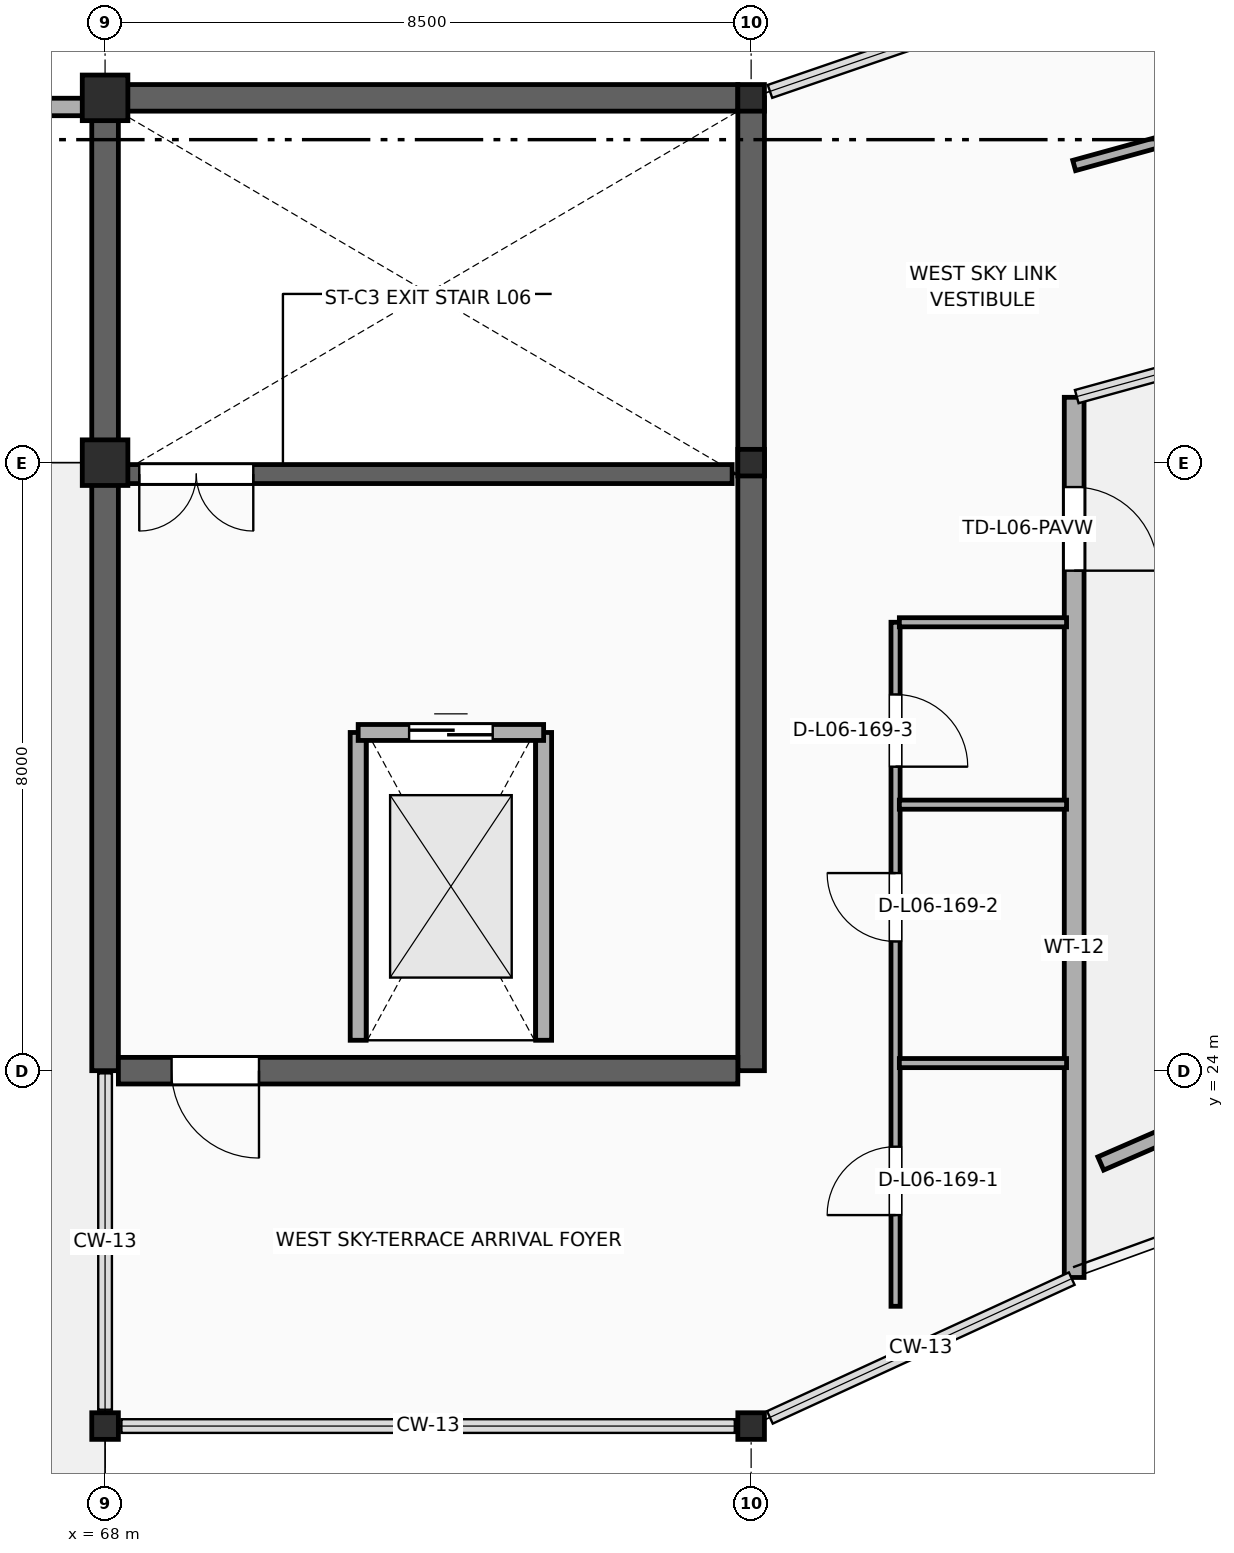
"""IFC4 building model, lengths in metres.
Left out: names, types, materials, properties, quantities, classifications, styles, units other than length and angle.
Written with IfcOpenShell. Run it as: python <this file> out.ifc"""

import sys

from ifc_helpers import new_model, si_unit, direction, frame, frame_2d, origin, origin_2d, place, context, subcontext, project, spatial, rectangle, i_section, extrude, element, fill, save


model = new_model("IFC4")
c1 = context("Model", 3, precision=1e-05, world=origin(), true_north=direction((0.0, 1.0)))
c2 = subcontext(c1, "Body", "Model", "MODEL_VIEW")
j1 = project(units=[si_unit("LENGTHUNIT", "METRE"), si_unit("PLANEANGLEUNIT", "RADIAN")], contexts=[c1])
p1 = place(None, origin())
s1 = spatial("IfcSite", under=j1, at=p1, CompositionType="ELEMENT")
p2 = place(p1, origin())
s2 = spatial("IfcBuilding", under=s1, at=p2, CompositionType="ELEMENT")
p3 = place(p2, frame((0.0, 0.0, 29.4)))
s3 = spatial("IfcBuildingStorey", under=s2, at=p3, CompositionType="ELEMENT", Elevation=29.4)
for number, where, z_axis, x_axis in (
    (1, (68.0, 24.0, 0.0), (0.0, 0.0, 1.0), (0.0, 1.0, 0.0)),
    (2, (76.5, 24.0, 0.0), (0.0, 0.0, 1.0), (0.0, 1.0, 0.0)),
):
    element("IfcWall", number, at=place(p3, frame(where, z_axis=z_axis, x_axis=x_axis)), inside=s3, PredefinedType="SHEAR", context=c2, shape_type="SweptSolid", body=[
        extrude(rectangle(XDim=12.8, YDim=0.35, at=frame_2d((6.4, 0.0))), origin(), (0.0, 0.0, 1.0), 4.49),
    ])
p4 = place(p3, frame((68.175, 36.8, 0.0), z_axis=(0.0, 0.0, 1.0), x_axis=(1.0, 0.0, 0.0)))
e3 = element("IfcWall", 3, at=p4, inside=s3, PredefinedType="SHEAR", context=c2, shape_type="SweptSolid", body=[
    extrude(rectangle(XDim=8.15, YDim=0.35, at=frame_2d((4.075, 0.0))), origin(), (0.0, 0.0, 1.0), 4.49),
])
p5 = place(p3, frame((68.175, 24.0, 0.0), z_axis=(0.0, 0.0, 1.0), x_axis=(1.0, 0.0, 0.0)))
e4 = element("IfcWall", 4, at=p5, inside=s3, PredefinedType="SHEAR", context=c2, shape_type="SweptSolid", body=[
    extrude(rectangle(XDim=8.15, YDim=0.35, at=frame_2d((4.075, 0.0))), origin(), (0.0, 0.0, 1.0), 4.49),
])
p6 = place(p5, frame((0.7, 0.0, 0.0)))
e5 = element("IfcOpeningElement", 5, at=p6, cuts=e4, PredefinedType="OPENING", context=c2, shape_type="SweptSolid", body=[
    extrude(rectangle(XDim=1.15, YDim=2.2, at=frame_2d((0.575, 1.1))), frame((0.0, 0.187, 0.0), z_axis=(0.0, -1.0, 0.0), x_axis=(1.0, 0.0, 0.0)), (0.0, 0.0, 1.0), 0.374),
])
p7 = place(p3, frame((68.25, 31.85, 0.0), z_axis=(0.0, 0.0, 1.0), x_axis=(1.0, 0.0, 0.0)))
e6 = element("IfcWall", 6, at=p7, inside=s3, PredefinedType="STANDARD", context=c2, shape_type="SweptSolid", body=[
    extrude(rectangle(XDim=8.0, YDim=0.25, at=frame_2d((4.0, 0.0))), origin(), (0.0, 0.0, 1.0), 4.49),
])
p8 = place(p7, frame((0.2, 0.0, 0.0)))
e7 = element("IfcOpeningElement", 7, at=p8, cuts=e6, PredefinedType="OPENING", context=c2, shape_type="SweptSolid", body=[
    extrude(rectangle(XDim=1.5, YDim=2.2, at=frame_2d((0.75, 1.1))), frame((0.0, 0.137, 0.0), z_axis=(0.0, -1.0, 0.0), x_axis=(1.0, 0.0, 0.0)), (0.0, 0.0, 1.0), 0.274),
])
for number, where, z_axis, x_axis in (
    (8, (71.33, 24.4, 0.0), (0.0, 0.0, 1.0), (0.0, 1.0, 0.0)),
    (9, (73.77, 24.4, 0.0), (0.0, 0.0, 1.0), (0.0, 1.0, 0.0)),
):
    element("IfcWall", number, at=place(p3, frame(where, z_axis=z_axis, x_axis=x_axis)), inside=s3, PredefinedType="PARTITIONING", context=c2, shape_type="SweptSolid", body=[
        extrude(rectangle(XDim=4.05, YDim=0.21, at=frame_2d((2.025, 0.0))), origin(), (0.0, 0.0, 1.0), 4.49),
    ])
p9 = place(p3, frame((71.33, 28.45, 0.0), z_axis=(0.0, 0.0, 1.0), x_axis=(1.0, 0.0, 0.0)))
e10 = element("IfcWall", 10, at=p9, inside=s3, PredefinedType="PARTITIONING", context=c2, shape_type="SweptSolid", body=[
    extrude(rectangle(XDim=2.44, YDim=0.21, at=frame_2d((1.22, 0.0))), origin(), (0.0, 0.0, 1.0), 4.49),
])
p10 = place(p9, frame((0.67, 0.0, 0.0)))
e11 = element("IfcOpeningElement", 11, at=p10, cuts=e10, PredefinedType="OPENING", context=c2, shape_type="SweptSolid", body=[
    extrude(rectangle(XDim=1.1, YDim=2.2, at=frame_2d((0.55, 1.1))), frame((0.0, 0.117, 0.0), z_axis=(0.0, -1.0, 0.0), x_axis=(1.0, 0.0, 0.0)), (0.0, 0.0, 1.0), 0.234),
])
for number, where, z_axis, x_axis in (
    (12, (68.0, 32.0, 0.0), (0.0, 0.0, 1.0), (1.0, 0.0, 0.0)),
    (13, (68.0, 36.8, 0.0), (0.0, 0.0, 1.0), (1.0, 0.0, 0.0)),
):
    element("IfcColumn", number, at=place(p3, frame(where, z_axis=z_axis, x_axis=x_axis)), inside=s3, PredefinedType="COLUMN", context=c2, shape_type="SweptSolid", body=[
        extrude(rectangle(XDim=0.6, YDim=0.6, at=origin_2d()), origin(), (0.0, 0.0, 1.0), 4.49),
    ])
for number, where, z_axis, x_axis in (
    (14, (76.5, 32.0, 0.0), (0.0, 0.0, 1.0), (1.0, 0.0, 0.0)),
    (15, (76.5, 36.8, 0.0), (0.0, 0.0, 1.0), (1.0, 0.0, 0.0)),
    (16, (68.0, 19.324, 0.0), (0.0, 0.0, 1.0), (1.0, 0.0, 0.0)),
    (17, (76.5, 19.324, 0.0), (0.0, 0.0, 1.0), (1.0, 0.0, 0.0)),
):
    element("IfcColumn", number, at=place(p3, frame(where, z_axis=z_axis, x_axis=x_axis)), inside=s3, PredefinedType="COLUMN", context=c2, shape_type="SweptSolid", body=[
        extrude(i_section(OverallWidth=0.35, OverallDepth=0.35, WebThickness=0.012, FlangeThickness=0.019, at=origin_2d()), origin(), (0.0, 0.0, 1.0), 4.49),
    ])
p11 = place(p3, frame((80.75, 21.279, 0.0), z_axis=(0.0, 0.0, 1.0), x_axis=(0.0, 1.0, 0.0)))
e18 = element("IfcWall", 18, at=p11, inside=s3, PredefinedType="STANDARD", context=c2, shape_type="SweptSolid", body=[
    extrude(rectangle(XDim=11.581, YDim=0.26, at=frame_2d((5.791, 0.0))), origin(), (0.0, 0.0, 1.0), 4.45),
])
p12 = place(p11, frame((9.3, 0.0, 0.0)))
e19 = element("IfcOpeningElement", 19, at=p12, cuts=e18, PredefinedType="OPENING", context=c2, shape_type="SweptSolid", body=[
    extrude(rectangle(XDim=1.1, YDim=2.2, at=frame_2d((0.55, 1.1))), frame((0.0, 0.142, 0.0), z_axis=(0.0, -1.0, 0.0), x_axis=(1.0, 0.0, 0.0)), (0.0, 0.0, 1.0), 0.284),
])
p13 = place(p3, frame((81.1, 22.779, 0.0), z_axis=(0.0, 0.0, 1.0), x_axis=(0.916925624611, 0.399058139789, 0.0)))
e20 = element("IfcWall", 20, at=p13, inside=s3, PredefinedType="PARAPET", context=c2, shape_type="SweptSolid", body=[
    extrude(rectangle(XDim=3.871, YDim=0.19, at=frame_2d((1.936, 0.0))), origin(), (0.0, 0.0, 1.0), 0.42),
])
p14 = place(p3, frame((34.12, 36.68, 0.0), z_axis=(0.0, 0.0, 1.0), x_axis=(1.0, 0.0, 0.0)))
e21 = element("IfcWall", 21, at=p14, inside=s3, PredefinedType="PARAPET", context=c2, shape_type="SweptSolid", body=[
    extrude(rectangle(XDim=33.76, YDim=0.23, at=frame_2d((16.88, 0.0))), origin(), (0.0, 0.0, 1.0), 1.15),
])
p15 = place(p3, frame((78.4, 20.9, 0.0), z_axis=(0.0, 0.0, 1.0), x_axis=(0.0, 1.0, 0.0)))
e22 = element("IfcWall", 22, at=p15, inside=s3, PredefinedType="PARTITIONING", context=c2, shape_type="SweptSolid", body=[
    extrude(rectangle(XDim=9.0, YDim=0.12, at=frame_2d((4.5, 0.0))), origin(), (0.0, 0.0, 1.0), 4.5),
])
p16 = place(p15, frame((1.2, 0.0, 0.0)))
e23 = element("IfcOpeningElement", 23, at=p16, cuts=e22, PredefinedType="OPENING", context=c2, shape_type="SweptSolid", body=[
    extrude(rectangle(XDim=0.9, YDim=2.15, at=frame_2d((0.45, 1.075))), frame((0.0, 0.072, 0.0), z_axis=(0.0, -1.0, 0.0), x_axis=(1.0, 0.0, 0.0)), (0.0, 0.0, 1.0), 0.144),
])
p17 = place(p15, frame((4.8, 0.0, 0.0)))
e24 = element("IfcOpeningElement", 24, at=p17, cuts=e22, PredefinedType="OPENING", context=c2, shape_type="SweptSolid", body=[
    extrude(rectangle(XDim=0.9, YDim=2.15, at=frame_2d((0.45, 1.075))), frame((0.0, 0.072, 0.0), z_axis=(0.0, -1.0, 0.0), x_axis=(1.0, 0.0, 0.0)), (0.0, 0.0, 1.0), 0.144),
])
p18 = place(p15, frame((7.1, 0.0, 0.0)))
e25 = element("IfcOpeningElement", 25, at=p18, cuts=e22, PredefinedType="OPENING", context=c2, shape_type="SweptSolid", body=[
    extrude(rectangle(XDim=0.95, YDim=2.15, at=frame_2d((0.475, 1.075))), frame((0.0, 0.072, 0.0), z_axis=(0.0, -1.0, 0.0), x_axis=(1.0, 0.0, 0.0)), (0.0, 0.0, 1.0), 0.144),
])
for number, where, z_axis, x_axis in (
    (26, (78.45, 24.1, 0.0), (0.0, 0.0, 1.0), (1.0, 0.0, 0.0)),
    (27, (78.45, 27.5, 0.0), (0.0, 0.0, 1.0), (1.0, 0.0, 0.0)),
    (28, (78.45, 29.9, 0.0), (0.0, 0.0, 1.0), (1.0, 0.0, 0.0)),
):
    element("IfcWall", number, at=place(p3, frame(where, z_axis=z_axis, x_axis=x_axis)), inside=s3, PredefinedType="PARTITIONING", context=c2, shape_type="SweptSolid", body=[
        extrude(rectangle(XDim=2.2, YDim=0.12, at=frame_2d((1.1, 0.0))), origin(), (0.0, 0.0, 1.0), 4.5),
    ])
p19 = place(p3, frame((80.75, 35.91, 0.0), z_axis=(0.0, 0.0, 1.0), x_axis=(0.964066503431, 0.265661018897, 0.0)))
e29 = element("IfcWall", 29, at=p19, inside=s3, PredefinedType="PARTITIONING", context=c2, shape_type="SweptSolid", body=[
    extrude(rectangle(XDim=4.408, YDim=0.14, at=frame_2d((2.204, 0.0))), origin(), (0.0, 0.0, 1.0), 4.082),
])
p20 = place(p8, frame((1.5, 0.0, 0.0), z_axis=(0.0, 0.0, 1.0), x_axis=(-1.0, 0.0, 0.0)))
e30 = element("IfcDoor", 30, at=p20, inside=s3, OperationType="DOUBLE_DOOR_SINGLE_SWING", PredefinedType="DOOR", context=c2, shape_type="SweptSolid", body=[
    extrude(rectangle(XDim=1.5, YDim=2.2, at=frame_2d((0.75, 1.1))), frame((0.0, 0.025, 0.0), z_axis=(0.0, -1.0, 0.0), x_axis=(1.0, 0.0, 0.0)), (0.0, 0.0, 1.0), 0.05),
])
fill(e7, e30)
p21 = place(p10, origin())
e31 = element("IfcDoor", 31, at=p21, inside=s3, OperationType="DOUBLE_DOOR_SLIDING", PredefinedType="DOOR", context=c2, shape_type="SweptSolid", body=[
    extrude(rectangle(XDim=1.1, YDim=2.2, at=frame_2d((0.55, 1.1))), frame((0.0, 0.025, 0.0), z_axis=(0.0, -1.0, 0.0), x_axis=(1.0, 0.0, 0.0)), (0.0, 0.0, 1.0), 0.05),
])
fill(e11, e31)
p22 = place(p6, frame((1.15, 0.0, 0.0), z_axis=(0.0, 0.0, 1.0), x_axis=(-1.0, 0.0, 0.0)))
e32 = element("IfcDoor", 32, at=p22, inside=s3, OperationType="SINGLE_SWING_RIGHT", PredefinedType="DOOR", context=c2, shape_type="SweptSolid", body=[
    extrude(rectangle(XDim=1.15, YDim=2.2, at=frame_2d((0.575, 1.1))), frame((0.0, 0.025, 0.0), z_axis=(0.0, -1.0, 0.0), x_axis=(1.0, 0.0, 0.0)), (0.0, 0.0, 1.0), 0.05),
])
fill(e5, e32)
p23 = place(p12, frame((1.1, 0.0, 0.0), z_axis=(0.0, 0.0, 1.0), x_axis=(-1.0, 0.0, 0.0)))
e33 = element("IfcDoor", 33, at=p23, inside=s3, OperationType="SINGLE_SWING_LEFT", PredefinedType="DOOR", context=c2, shape_type="SweptSolid", body=[
    extrude(rectangle(XDim=1.1, YDim=2.2, at=frame_2d((0.55, 1.1))), frame((0.0, 0.025, 0.0), z_axis=(0.0, -1.0, 0.0), x_axis=(1.0, 0.0, 0.0)), (0.0, 0.0, 1.0), 0.05),
])
fill(e19, e33)
p24 = place(p16, origin())
e34 = element("IfcDoor", 34, at=p24, inside=s3, OperationType="SINGLE_SWING_LEFT", PredefinedType="DOOR", context=c2, shape_type="SweptSolid", body=[
    extrude(rectangle(XDim=0.9, YDim=2.15, at=frame_2d((0.45, 1.075))), frame((0.0, 0.025, 0.0), z_axis=(0.0, -1.0, 0.0), x_axis=(1.0, 0.0, 0.0)), (0.0, 0.0, 1.0), 0.05),
])
fill(e23, e34)
p25 = place(p17, origin())
e35 = element("IfcDoor", 35, at=p25, inside=s3, OperationType="SINGLE_SWING_RIGHT", PredefinedType="DOOR", context=c2, shape_type="SweptSolid", body=[
    extrude(rectangle(XDim=0.9, YDim=2.15, at=frame_2d((0.45, 1.075))), frame((0.0, 0.025, 0.0), z_axis=(0.0, -1.0, 0.0), x_axis=(1.0, 0.0, 0.0)), (0.0, 0.0, 1.0), 0.05),
])
fill(e24, e35)
p26 = place(p18, frame((0.95, 0.0, 0.0), z_axis=(0.0, 0.0, 1.0), x_axis=(-1.0, 0.0, 0.0)))
e36 = element("IfcDoor", 36, at=p26, inside=s3, OperationType="SINGLE_SWING_LEFT", PredefinedType="DOOR", context=c2, shape_type="SweptSolid", body=[
    extrude(rectangle(XDim=0.95, YDim=2.15, at=frame_2d((0.475, 1.075))), frame((0.0, 0.025, 0.0), z_axis=(0.0, -1.0, 0.0), x_axis=(1.0, 0.0, 0.0)), (0.0, 0.0, 1.0), 0.05),
])
fill(e25, e36)
save(model, sys.argv[1])
